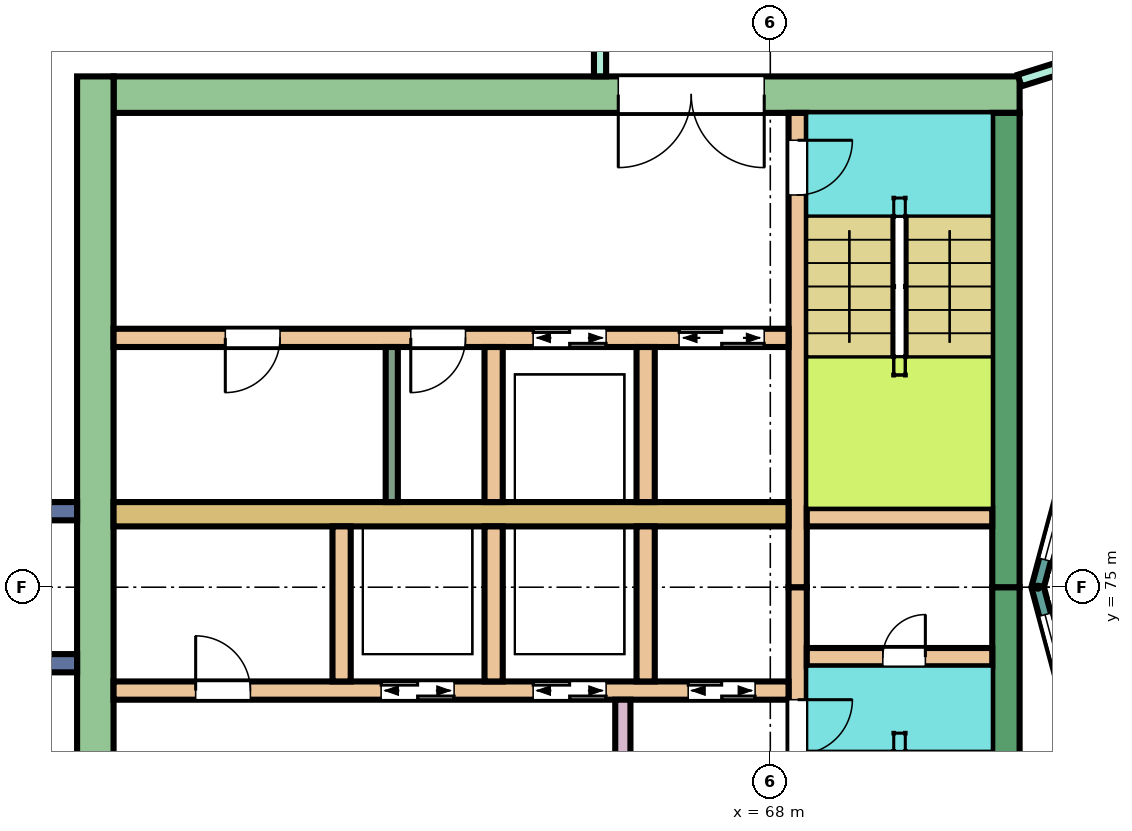
"""IFC4 building model, lengths in metres.
Left out: names, types, materials, properties, quantities, classifications, styles, units other than length and angle.
Written with IfcOpenShell. Run it as: python <this file> out.ifc"""

import sys

from ifc_helpers import new_model, si_unit, direction, frame, frame_2d, origin, place, context, subcontext, project, spatial, rectangle, extrude, element, fill, save


model = new_model("IFC4")
c1 = context("Model", 3, precision=1e-05, world=origin(), true_north=direction((0.0, 1.0)))
c2 = subcontext(c1, "Body", "Model", "MODEL_VIEW")
j1 = project(units=[si_unit("LENGTHUNIT", "METRE"), si_unit("PLANEANGLEUNIT", "RADIAN")], contexts=[c1])
p1 = place(None, origin())
s1 = spatial("IfcSite", under=j1, at=p1, CompositionType="ELEMENT")
p2 = place(p1, origin())
s2 = spatial("IfcBuilding", under=s1, at=p2, CompositionType="ELEMENT")
p3 = place(p2, frame((0.0, 0.0, 270.9)))
s3 = spatial("IfcBuildingStorey", under=s2, at=p3, CompositionType="ELEMENT", Elevation=270.9)
p4 = place(p3, frame((72.1, 83.1, 0.0), z_axis=(0.0, 0.0, 1.0), x_axis=(-1.0, 0.0, 0.0)))
e1 = element("IfcWall", 1, at=p4, inside=s3, PredefinedType="SHEAR", context=c2, shape_type="SweptSolid", body=[
    extrude(rectangle(XDim=14.9, YDim=0.6, at=frame_2d((7.45, 0.0))), origin(), (0.0, 0.0, 1.0), 4.48),
])
p5 = place(p4, frame((4.2, 0.0, 0.0)))
e2 = element("IfcOpeningElement", 2, at=p5, cuts=e1, PredefinedType="OPENING", context=c2, shape_type="SweptSolid", body=[
    extrude(rectangle(XDim=2.4, YDim=2.4, at=frame_2d((1.2, 1.2))), frame((0.0, 0.31, 0.0), z_axis=(0.0, -1.0, 0.0), x_axis=(1.0, 0.0, 0.0)), (0.0, 0.0, 1.0), 0.62),
])
for number, where, z_axis, x_axis in (
    (3, (71.875, 75.0, 0.0), (0.0, 0.0, 1.0), (0.0, -1.0, 0.0)),
    (4, (71.875, 82.8, 0.0), (0.0, 0.0, 1.0), (0.0, -1.0, 0.0)),
):
    element("IfcWall", number, at=place(p3, frame(where, z_axis=z_axis, x_axis=x_axis)), inside=s3, PredefinedType="SHEAR", context=c2, shape_type="SweptSolid", body=[
        extrude(rectangle(XDim=7.8, YDim=0.45, at=frame_2d((3.9, 0.0))), origin(), (0.0, 0.0, 1.0), 4.48),
    ])
p6 = place(p3, frame((56.9, 83.4, 0.0), z_axis=(0.0, 0.0, 1.0), x_axis=(0.0, -1.0, 0.0)))
e5 = element("IfcWall", 5, at=p6, inside=s3, PredefinedType="SHEAR", context=c2, shape_type="SweptSolid", body=[
    extrude(rectangle(XDim=16.8, YDim=0.6, at=frame_2d((8.4, 0.0))), origin(), (0.0, 0.0, 1.0), 4.48),
])
p7 = place(p3, frame((68.45, 75.0, 0.0), z_axis=(0.0, 0.0, 1.0), x_axis=(0.0, -1.0, 0.0)))
e6 = element("IfcWall", 6, at=p7, inside=s3, PredefinedType="SHEAR", context=c2, shape_type="SweptSolid", body=[
    extrude(rectangle(XDim=7.8, YDim=0.3, at=frame_2d((3.9, 0.0))), origin(), (0.0, 0.0, 1.0), 4.48),
])
p8 = place(p7, frame((1.85, 0.0, 0.0)))
e7 = element("IfcOpeningElement", 7, at=p8, cuts=e6, PredefinedType="OPENING", context=c2, shape_type="SweptSolid", body=[
    extrude(rectangle(XDim=0.9, YDim=2.1, at=frame_2d((0.45, 1.05))), frame((0.0, 0.16, 0.0), z_axis=(0.0, -1.0, 0.0), x_axis=(1.0, 0.0, 0.0)), (0.0, 0.0, 1.0), 0.32),
])
p9 = place(p3, frame((68.45, 82.8, 0.0), z_axis=(0.0, 0.0, 1.0), x_axis=(0.0, -1.0, 0.0)))
e8 = element("IfcWall", 8, at=p9, inside=s3, PredefinedType="SHEAR", context=c2, shape_type="SweptSolid", body=[
    extrude(rectangle(XDim=7.8, YDim=0.3, at=frame_2d((3.9, 0.0))), origin(), (0.0, 0.0, 1.0), 4.48),
])
p10 = place(p9, frame((0.45, 0.0, 0.0)))
e9 = element("IfcOpeningElement", 9, at=p10, cuts=e8, PredefinedType="OPENING", context=c2, shape_type="SweptSolid", body=[
    extrude(rectangle(XDim=0.9, YDim=2.1, at=frame_2d((0.45, 1.05))), frame((0.0, 0.16, 0.0), z_axis=(0.0, -1.0, 0.0), x_axis=(1.0, 0.0, 0.0)), (0.0, 0.0, 1.0), 0.32),
])
p11 = place(p3, frame((71.65, 73.85, 0.0), z_axis=(0.0, 0.0, 1.0), x_axis=(-1.0, 0.0, 0.0)))
e10 = element("IfcWall", 10, at=p11, inside=s3, PredefinedType="SHEAR", context=c2, shape_type="SweptSolid", body=[
    extrude(rectangle(XDim=3.05, YDim=0.3, at=frame_2d((1.525, 0.0))), origin(), (0.0, 0.0, 1.0), 4.48),
])
p12 = place(p11, frame((1.1, 0.0, 0.0)))
e11 = element("IfcOpeningElement", 11, at=p12, cuts=e10, PredefinedType="OPENING", context=c2, shape_type="SweptSolid", body=[
    extrude(rectangle(XDim=0.7, YDim=2.0, at=frame_2d((0.35, 1.0))), frame((0.0, 0.16, 0.0), z_axis=(0.0, -1.0, 0.0), x_axis=(1.0, 0.0, 0.0)), (0.0, 0.0, 1.0), 0.32),
])
p13 = place(p3, frame((71.65, 76.15, 0.0), z_axis=(0.0, 0.0, 1.0), x_axis=(-1.0, 0.0, 0.0)))
e12 = element("IfcWall", 12, at=p13, inside=s3, PredefinedType="SHEAR", context=c2, shape_type="SweptSolid", body=[
    extrude(rectangle(XDim=3.05, YDim=0.3, at=frame_2d((1.525, 0.0))), origin(), (0.0, 0.0, 1.0), 4.48),
])
p14 = place(p3, frame((68.3, 73.3, 0.0), z_axis=(0.0, 0.0, 1.0), x_axis=(-1.0, 0.0, 0.0)))
e13 = element("IfcWall", 13, at=p14, inside=s3, PredefinedType="SHEAR", context=c2, shape_type="SweptSolid", body=[
    extrude(rectangle(XDim=11.1, YDim=0.3, at=frame_2d((5.55, 0.0))), origin(), (0.0, 0.0, 1.0), 4.48),
])
p15 = place(p14, frame((0.55, 0.0, 0.0)))
e14 = element("IfcOpeningElement", 14, at=p15, cuts=e13, PredefinedType="OPENING", context=c2, shape_type="SweptSolid", body=[
    extrude(rectangle(XDim=1.1, YDim=2.1, at=frame_2d((0.55, 1.05))), frame((0.0, 0.16, 0.0), z_axis=(0.0, -1.0, 0.0), x_axis=(1.0, 0.0, 0.0)), (0.0, 0.0, 1.0), 0.32),
])
p16 = place(p14, frame((3.0, 0.0, 0.0)))
e15 = element("IfcOpeningElement", 15, at=p16, cuts=e13, PredefinedType="OPENING", context=c2, shape_type="SweptSolid", body=[
    extrude(rectangle(XDim=1.2, YDim=2.1, at=frame_2d((0.6, 1.05))), frame((0.0, 0.16, 0.0), z_axis=(0.0, -1.0, 0.0), x_axis=(1.0, 0.0, 0.0)), (0.0, 0.0, 1.0), 0.32),
])
p17 = place(p14, frame((5.5, 0.0, 0.0)))
e16 = element("IfcOpeningElement", 16, at=p17, cuts=e13, PredefinedType="OPENING", context=c2, shape_type="SweptSolid", body=[
    extrude(rectangle(XDim=1.2, YDim=2.1, at=frame_2d((0.6, 1.05))), frame((0.0, 0.16, 0.0), z_axis=(0.0, -1.0, 0.0), x_axis=(1.0, 0.0, 0.0)), (0.0, 0.0, 1.0), 0.32),
])
p18 = place(p14, frame((8.85, 0.0, 0.0)))
e17 = element("IfcOpeningElement", 17, at=p18, cuts=e13, PredefinedType="OPENING", context=c2, shape_type="SweptSolid", body=[
    extrude(rectangle(XDim=0.9, YDim=2.1, at=frame_2d((0.45, 1.05))), frame((0.0, 0.16, 0.0), z_axis=(0.0, -1.0, 0.0), x_axis=(1.0, 0.0, 0.0)), (0.0, 0.0, 1.0), 0.32),
])
p19 = place(p3, frame((68.3, 76.2, 0.0), z_axis=(0.0, 0.0, 1.0), x_axis=(-1.0, 0.0, 0.0)))
e18 = element("IfcWall", 18, at=p19, inside=s3, PredefinedType="SHEAR", context=c2, shape_type="SweptSolid", body=[
    extrude(rectangle(XDim=11.1, YDim=0.4, at=frame_2d((5.55, 0.0))), origin(), (0.0, 0.0, 1.0), 4.48),
])
p20 = place(p3, frame((68.3, 79.1, 0.0), z_axis=(0.0, 0.0, 1.0), x_axis=(-1.0, 0.0, 0.0)))
e19 = element("IfcWall", 19, at=p20, inside=s3, PredefinedType="SHEAR", context=c2, shape_type="SweptSolid", body=[
    extrude(rectangle(XDim=11.1, YDim=0.3, at=frame_2d((5.55, 0.0))), origin(), (0.0, 0.0, 1.0), 4.48),
])
p21 = place(p20, frame((0.4, 0.0, 0.0)))
e20 = element("IfcOpeningElement", 20, at=p21, cuts=e19, PredefinedType="OPENING", context=c2, shape_type="SweptSolid", body=[
    extrude(rectangle(XDim=1.4, YDim=2.1, at=frame_2d((0.7, 1.05))), frame((0.0, 0.16, 0.0), z_axis=(0.0, -1.0, 0.0), x_axis=(1.0, 0.0, 0.0)), (0.0, 0.0, 1.0), 0.32),
])
p22 = place(p20, frame((3.0, 0.0, 0.0)))
e21 = element("IfcOpeningElement", 21, at=p22, cuts=e19, PredefinedType="OPENING", context=c2, shape_type="SweptSolid", body=[
    extrude(rectangle(XDim=1.2, YDim=2.1, at=frame_2d((0.6, 1.05))), frame((0.0, 0.16, 0.0), z_axis=(0.0, -1.0, 0.0), x_axis=(1.0, 0.0, 0.0)), (0.0, 0.0, 1.0), 0.32),
])
p23 = place(p20, frame((5.312, 0.0, 0.0)))
e22 = element("IfcOpeningElement", 22, at=p23, cuts=e19, PredefinedType="OPENING", context=c2, shape_type="SweptSolid", body=[
    extrude(rectangle(XDim=0.9, YDim=2.1, at=frame_2d((0.45, 1.05))), frame((0.0, 0.16, 0.0), z_axis=(0.0, -1.0, 0.0), x_axis=(1.0, 0.0, 0.0)), (0.0, 0.0, 1.0), 0.32),
])
p24 = place(p20, frame((8.363, 0.0, 0.0)))
e23 = element("IfcOpeningElement", 23, at=p24, cuts=e19, PredefinedType="OPENING", context=c2, shape_type="SweptSolid", body=[
    extrude(rectangle(XDim=0.9, YDim=2.1, at=frame_2d((0.45, 1.05))), frame((0.0, 0.16, 0.0), z_axis=(0.0, -1.0, 0.0), x_axis=(1.0, 0.0, 0.0)), (0.0, 0.0, 1.0), 0.32),
])
for number, where, z_axis, x_axis in (
    (24, (65.95, 76.0, 0.0), (0.0, 0.0, 1.0), (0.0, -1.0, 0.0)),
    (25, (63.45, 76.0, 0.0), (0.0, 0.0, 1.0), (0.0, -1.0, 0.0)),
    (26, (60.95, 76.0, 0.0), (0.0, 0.0, 1.0), (0.0, -1.0, 0.0)),
    (27, (65.95, 78.95, 0.0), (0.0, 0.0, 1.0), (0.0, -1.0, 0.0)),
    (28, (63.45, 78.95, 0.0), (0.0, 0.0, 1.0), (0.0, -1.0, 0.0)),
):
    element("IfcWall", number, at=place(p3, frame(where, z_axis=z_axis, x_axis=x_axis)), inside=s3, PredefinedType="SHEAR", context=c2, shape_type="SweptSolid", body=[
        extrude(rectangle(XDim=2.55, YDim=0.3, at=frame_2d((1.275, 0.0))), origin(), (0.0, 0.0, 1.0), 4.48),
    ])
p25 = place(p3, frame((65.575, 73.15, 0.0), z_axis=(0.0, 0.0, 1.0), x_axis=(0.0, -1.0, 0.0)))
e29 = element("IfcWall", 29, at=p25, inside=s3, PredefinedType="SHEAR", context=c2, shape_type="SweptSolid", body=[
    extrude(rectangle(XDim=1.5, YDim=0.25, at=frame_2d((0.75, 0.0))), origin(), (0.0, 0.0, 1.0), 4.48),
])
for number, where, z_axis, x_axis in (
    (30, (56.6, 76.25, 0.0), (0.0, 0.0, 1.0), (-1.0, 0.0, 0.0)),
    (31, (56.6, 73.75, 0.0), (0.0, 0.0, 1.0), (-1.0, 0.0, 0.0)),
):
    element("IfcWall", number, at=place(p3, frame(where, z_axis=z_axis, x_axis=x_axis)), inside=s3, PredefinedType="NOTDEFINED", context=c2, shape_type="SweptSolid", body=[
        extrude(rectangle(XDim=2.416, YDim=0.3, at=frame_2d((1.208, 0.0))), origin(), (0.0, 0.0, 1.0), 4.8),
    ])
p26 = place(p3, frame((73.415, 78.802, 0.0), z_axis=(0.0, 0.0, 1.0), x_axis=(-0.258789828301, -0.965933654434, 0.0)))
e32 = element("IfcWall", 32, at=p26, inside=s3, PredefinedType="NOTDEFINED", context=c2, shape_type="SweptSolid", body=[
    extrude(rectangle(XDim=3.936, YDim=0.2, at=frame_2d((1.968, 0.0))), origin(), (0.0, 0.0, 1.0), 4.8),
])
p27 = place(p26, frame((0.468, 0.0, 0.9)))
e33 = element("IfcOpeningElement", 33, at=p27, cuts=e32, PredefinedType="OPENING", context=c2, shape_type="SweptSolid", body=[
    extrude(rectangle(XDim=3.0, YDim=2.3, at=frame_2d((1.5, 1.15))), frame((0.0, 0.11, 0.0), z_axis=(0.0, -1.0, 0.0), x_axis=(1.0, 0.0, 0.0)), (0.0, 0.0, 1.0), 0.22),
])
p28 = place(p3, frame((72.396, 75.0, 0.0), z_axis=(0.0, 0.0, 1.0), x_axis=(0.258789828301, -0.965933654434, 0.0)))
e34 = element("IfcWall", 34, at=p28, inside=s3, PredefinedType="NOTDEFINED", context=c2, shape_type="SweptSolid", body=[
    extrude(rectangle(XDim=3.936, YDim=0.2, at=frame_2d((1.968, 0.0))), origin(), (0.0, 0.0, 1.0), 4.8),
])
p29 = place(p28, frame((0.468, 0.0, 0.9)))
e35 = element("IfcOpeningElement", 35, at=p29, cuts=e34, PredefinedType="OPENING", context=c2, shape_type="SweptSolid", body=[
    extrude(rectangle(XDim=3.0, YDim=2.3, at=frame_2d((1.5, 1.15))), frame((0.0, 0.11, 0.0), z_axis=(0.0, -1.0, 0.0), x_axis=(1.0, 0.0, 0.0)), (0.0, 0.0, 1.0), 0.22),
])
p30 = place(p3, frame((65.2, 83.401, 0.0), z_axis=(0.0, 0.0, 1.0), x_axis=(0.0, 1.0, 0.0)))
e36 = element("IfcWall", 36, at=p30, inside=s3, PredefinedType="PARTITIONING", context=c2, shape_type="SweptSolid", body=[
    extrude(rectangle(XDim=1.399, YDim=0.2, at=frame_2d((0.7, 0.0))), origin(), (0.0, 0.0, 1.0), 4.35),
])
p31 = place(p3, frame((72.1, 83.332, 0.0), z_axis=(0.0, 0.0, 1.0), x_axis=(0.954233106619, 0.299063836383, 0.0)))
e37 = element("IfcWall", 37, at=p31, inside=s3, PredefinedType="PARTITIONING", context=c2, shape_type="SweptSolid", body=[
    extrude(rectangle(XDim=2.414, YDim=0.2, at=frame_2d((1.207, 0.0))), origin(), (0.0, 0.0, 1.0), 4.35),
])
p32 = place(p31, frame((0.762, 0.0, 0.0)))
e38 = element("IfcOpeningElement", 38, at=p32, cuts=e37, PredefinedType="OPENING", context=c2, shape_type="SweptSolid", body=[
    extrude(rectangle(XDim=0.9, YDim=2.1, at=frame_2d((0.45, 1.05))), frame((0.0, 0.11, 0.0), z_axis=(0.0, -1.0, 0.0), x_axis=(1.0, 0.0, 0.0)), (0.0, 0.0, 1.0), 0.22),
])
p33 = place(p3, frame((61.775, 78.95, 0.0), z_axis=(0.0, 0.0, 1.0), x_axis=(0.0, -1.0, 0.0)))
e39 = element("IfcWall", 39, at=p33, inside=s3, PredefinedType="PARTITIONING", context=c2, shape_type="SweptSolid", body=[
    extrude(rectangle(XDim=2.55, YDim=0.2, at=frame_2d((1.275, 0.0))), origin(), (0.0, 0.0, 1.0), 4.48),
])
p34 = place(p27, origin())
e40 = element("IfcWindow", 40, at=p34, inside=s3, PartitioningType="SINGLE_PANEL", PredefinedType="WINDOW", context=c2, shape_type="SweptSolid", body=[
    extrude(rectangle(XDim=3.0, YDim=2.3, at=frame_2d((1.5, 1.15))), frame((0.0, 0.03, 0.0), z_axis=(0.0, -1.0, 0.0), x_axis=(1.0, 0.0, 0.0)), (0.0, 0.0, 1.0), 0.06),
])
fill(e33, e40)
p35 = place(p29, origin())
e41 = element("IfcWindow", 41, at=p35, inside=s3, PartitioningType="SINGLE_PANEL", PredefinedType="WINDOW", context=c2, shape_type="SweptSolid", body=[
    extrude(rectangle(XDim=3.0, YDim=2.3, at=frame_2d((1.5, 1.15))), frame((0.0, 0.03, 0.0), z_axis=(0.0, -1.0, 0.0), x_axis=(1.0, 0.0, 0.0)), (0.0, 0.0, 1.0), 0.06),
])
fill(e35, e41)
p36 = place(p12, frame((0.7, 0.0, 0.0), z_axis=(0.0, 0.0, 1.0), x_axis=(-1.0, 0.0, 0.0)))
e42 = element("IfcDoor", 42, at=p36, inside=s3, OperationType="SINGLE_SWING_RIGHT", PredefinedType="DOOR", context=c2, shape_type="SweptSolid", body=[
    extrude(rectangle(XDim=0.7, YDim=2.0, at=frame_2d((0.35, 1.0))), frame((0.0, 0.025, 0.0), z_axis=(0.0, -1.0, 0.0), x_axis=(1.0, 0.0, 0.0)), (0.0, 0.0, 1.0), 0.05),
])
fill(e11, e42)
p37 = place(p8, origin())
e43 = element("IfcDoor", 43, at=p37, inside=s3, OperationType="SINGLE_SWING_LEFT", PredefinedType="DOOR", context=c2, shape_type="SweptSolid", body=[
    extrude(rectangle(XDim=0.9, YDim=2.1, at=frame_2d((0.45, 1.05))), frame((0.0, 0.025, 0.0), z_axis=(0.0, -1.0, 0.0), x_axis=(1.0, 0.0, 0.0)), (0.0, 0.0, 1.0), 0.05),
])
fill(e7, e43)
p38 = place(p10, origin())
e44 = element("IfcDoor", 44, at=p38, inside=s3, OperationType="SINGLE_SWING_LEFT", PredefinedType="DOOR", context=c2, shape_type="SweptSolid", body=[
    extrude(rectangle(XDim=0.9, YDim=2.1, at=frame_2d((0.45, 1.05))), frame((0.0, 0.025, 0.0), z_axis=(0.0, -1.0, 0.0), x_axis=(1.0, 0.0, 0.0)), (0.0, 0.0, 1.0), 0.05),
])
fill(e9, e44)
p39 = place(p15, origin())
e45 = element("IfcDoor", 45, at=p39, inside=s3, OperationType="DOUBLE_DOOR_SLIDING", PredefinedType="DOOR", context=c2, shape_type="SweptSolid", body=[
    extrude(rectangle(XDim=1.1, YDim=2.1, at=frame_2d((0.55, 1.05))), frame((0.0, 0.025, 0.0), z_axis=(0.0, -1.0, 0.0), x_axis=(1.0, 0.0, 0.0)), (0.0, 0.0, 1.0), 0.05),
])
fill(e14, e45)
p40 = place(p16, origin())
e46 = element("IfcDoor", 46, at=p40, inside=s3, OperationType="DOUBLE_DOOR_SLIDING", PredefinedType="DOOR", context=c2, shape_type="SweptSolid", body=[
    extrude(rectangle(XDim=1.2, YDim=2.1, at=frame_2d((0.6, 1.05))), frame((0.0, 0.025, 0.0), z_axis=(0.0, -1.0, 0.0), x_axis=(1.0, 0.0, 0.0)), (0.0, 0.0, 1.0), 0.05),
])
fill(e15, e46)
p41 = place(p17, origin())
e47 = element("IfcDoor", 47, at=p41, inside=s3, OperationType="DOUBLE_DOOR_SLIDING", PredefinedType="DOOR", context=c2, shape_type="SweptSolid", body=[
    extrude(rectangle(XDim=1.2, YDim=2.1, at=frame_2d((0.6, 1.05))), frame((0.0, 0.025, 0.0), z_axis=(0.0, -1.0, 0.0), x_axis=(1.0, 0.0, 0.0)), (0.0, 0.0, 1.0), 0.05),
])
fill(e16, e47)
p42 = place(p18, frame((0.9, 0.0, 0.0), z_axis=(0.0, 0.0, 1.0), x_axis=(-1.0, 0.0, 0.0)))
e48 = element("IfcDoor", 48, at=p42, inside=s3, OperationType="SINGLE_SWING_LEFT", PredefinedType="DOOR", context=c2, shape_type="SweptSolid", body=[
    extrude(rectangle(XDim=0.9, YDim=2.1, at=frame_2d((0.45, 1.05))), frame((0.0, 0.025, 0.0), z_axis=(0.0, -1.0, 0.0), x_axis=(1.0, 0.0, 0.0)), (0.0, 0.0, 1.0), 0.05),
])
fill(e17, e48)
p43 = place(p21, origin())
e49 = element("IfcDoor", 49, at=p43, inside=s3, OperationType="DOUBLE_DOOR_SLIDING", PredefinedType="DOOR", context=c2, shape_type="SweptSolid", body=[
    extrude(rectangle(XDim=1.4, YDim=2.1, at=frame_2d((0.7, 1.05))), frame((0.0, 0.025, 0.0), z_axis=(0.0, -1.0, 0.0), x_axis=(1.0, 0.0, 0.0)), (0.0, 0.0, 1.0), 0.05),
])
fill(e20, e49)
p44 = place(p22, origin())
e50 = element("IfcDoor", 50, at=p44, inside=s3, OperationType="DOUBLE_DOOR_SLIDING", PredefinedType="DOOR", context=c2, shape_type="SweptSolid", body=[
    extrude(rectangle(XDim=1.2, YDim=2.1, at=frame_2d((0.6, 1.05))), frame((0.0, 0.025, 0.0), z_axis=(0.0, -1.0, 0.0), x_axis=(1.0, 0.0, 0.0)), (0.0, 0.0, 1.0), 0.05),
])
fill(e21, e50)
p45 = place(p23, origin())
e51 = element("IfcDoor", 51, at=p45, inside=s3, OperationType="SINGLE_SWING_RIGHT", PredefinedType="DOOR", context=c2, shape_type="SweptSolid", body=[
    extrude(rectangle(XDim=0.9, YDim=2.1, at=frame_2d((0.45, 1.05))), frame((0.0, 0.025, 0.0), z_axis=(0.0, -1.0, 0.0), x_axis=(1.0, 0.0, 0.0)), (0.0, 0.0, 1.0), 0.05),
])
fill(e22, e51)
p46 = place(p24, origin())
e52 = element("IfcDoor", 52, at=p46, inside=s3, OperationType="SINGLE_SWING_RIGHT", PredefinedType="DOOR", context=c2, shape_type="SweptSolid", body=[
    extrude(rectangle(XDim=0.9, YDim=2.1, at=frame_2d((0.45, 1.05))), frame((0.0, 0.025, 0.0), z_axis=(0.0, -1.0, 0.0), x_axis=(1.0, 0.0, 0.0)), (0.0, 0.0, 1.0), 0.05),
])
fill(e23, e52)
p47 = place(p5, origin())
e53 = element("IfcDoor", 53, at=p47, inside=s3, OperationType="DOUBLE_DOOR_SINGLE_SWING", PredefinedType="DOOR", context=c2, shape_type="SweptSolid", body=[
    extrude(rectangle(XDim=2.4, YDim=2.4, at=frame_2d((1.2, 1.2))), frame((0.0, 0.025, 0.0), z_axis=(0.0, -1.0, 0.0), x_axis=(1.0, 0.0, 0.0)), (0.0, 0.0, 1.0), 0.05),
])
fill(e2, e53)
save(model, sys.argv[1])
